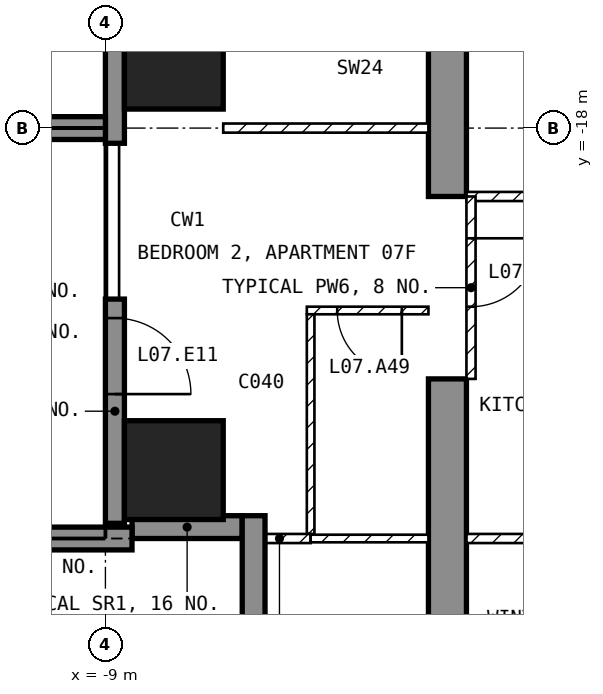
"""IFC4 building model, lengths in metres.
Left out: names, types, materials, properties, quantities, classifications, styles, units other than length and angle.
Written with IfcOpenShell. Run it as: python <this file> out.ifc"""

import sys

from ifc_helpers import new_model, si_unit, direction, frame, frame_2d, origin, origin_2d, place, context, subcontext, project, spatial, polyline, rectangle, outline, extrude, element, fill, save


model = new_model("IFC4")
c1 = context("Model", 3, precision=1e-05, world=origin(), true_north=direction((0.0, 1.0)))
c2 = subcontext(c1, "Body", "Model", "MODEL_VIEW")
j1 = project(units=[si_unit("LENGTHUNIT", "METRE"), si_unit("PLANEANGLEUNIT", "RADIAN")], contexts=[c1])
p1 = place(None, origin())
s1 = spatial("IfcSite", under=j1, at=p1, CompositionType="ELEMENT")
p2 = place(p1, origin())
s2 = spatial("IfcBuilding", under=s1, at=p2, CompositionType="ELEMENT")
p3 = place(p2, frame((0.0, 0.0, 43.5)))
s3 = spatial("IfcBuildingStorey", under=s2, at=p3, CompositionType="ELEMENT", Elevation=43.5)
for number, where, z_axis, x_axis in (
    (1, (-8.1, -22.5, -0.25), (0.0, 0.0, 1.0), (1.0, 0.0, 0.0)),
    (2, (-8.1, -17.1, -0.25), (0.0, 0.0, 1.0), (1.0, 0.0, 0.0)),
):
    element("IfcColumn", number, at=place(p3, frame(where, z_axis=z_axis, x_axis=x_axis)), inside=s3, PredefinedType="COLUMN", context=c2, shape_type="SweptSolid", body=[
        extrude(rectangle(XDim=1.3, YDim=1.3, at=origin_2d()), origin(), (0.0, 0.0, 1.0), 3.5),
    ])
p4 = place(p3, frame((-4.75, -25.45, -0.25), z_axis=(1.0, 0.0, 0.0), x_axis=(0.0, 1.0, 0.0)))
e3 = element("IfcWall", 3, at=p4, inside=s3, PredefinedType="SHEAR", context=c2, shape_type="SweptSolid", body=[
    extrude(outline(polyline([(0.0, 0.0), (4.15, 0.0), (4.15, 2.65), (6.55, 2.65), (6.55, 0.0), (11.95, 0.0), (11.95, 2.65), (14.35, 2.65), (14.35, 0.0), (16.45, 0.0), (16.45, 3.5), (0.0, 3.5), (0.0, 0.0)])), origin(), (0.0, 0.0, 1.0), 0.5),
])
p5 = place(p3, frame((-8.875, -14.65, 0.0), z_axis=(0.0, 0.0, 1.0), x_axis=(0.0, -1.0, 0.0)))
e4 = element("IfcWall", 4, at=p5, inside=s3, PredefinedType="SOLIDWALL", context=c2, shape_type="SweptSolid", body=[
    extrude(rectangle(XDim=3.55, YDim=0.25, at=frame_2d((1.775, 0.0))), origin(), (0.0, 0.0, 1.0), 3.25),
])
p6 = place(p5, frame((0.25, 0.0, 0.0)))
e5 = element("IfcOpeningElement", 5, at=p6, cuts=e4, PredefinedType="OPENING", context=c2, shape_type="SweptSolid", body=[
    extrude(rectangle(XDim=1.2, YDim=2.4, at=frame_2d((0.6, 1.2))), frame((0.0, 0.135, 0.0), z_axis=(0.0, -1.0, 0.0), x_axis=(1.0, 0.0, 0.0)), (0.0, 0.0, 1.0), 0.27),
])
p7 = place(p3, frame((-8.875, -20.25, 0.0), z_axis=(0.0, 0.0, 1.0), x_axis=(0.0, -1.0, 0.0)))
e6 = element("IfcWall", 6, at=p7, inside=s3, PredefinedType="SOLIDWALL", context=c2, shape_type="SweptSolid", body=[
    extrude(rectangle(XDim=2.95, YDim=0.25, at=frame_2d((1.475, 0.0))), origin(), (0.0, 0.0, 1.0), 3.25),
])
p8 = place(p7, frame((0.25, 0.0, 0.0)))
e7 = element("IfcOpeningElement", 7, at=p8, cuts=e6, PredefinedType="OPENING", context=c2, shape_type="SweptSolid", body=[
    extrude(rectangle(XDim=1.0, YDim=2.4, at=frame_2d((0.5, 1.2))), frame((0.0, 0.135, 0.0), z_axis=(0.0, -1.0, 0.0), x_axis=(1.0, 0.0, 0.0)), (0.0, 0.0, 1.0), 0.27),
])
p9 = place(p3, frame((-8.65, -23.25, 0.0), z_axis=(0.0, 0.0, 1.0), x_axis=(1.0, 0.0, 0.0)))
e8 = element("IfcWall", 8, at=p9, inside=s3, PredefinedType="SOLIDWALL", context=c2, shape_type="SweptSolid", body=[
    extrude(rectangle(XDim=1.45, YDim=0.3, at=frame_2d((0.725, 0.0))), origin(), (0.0, 0.0, 1.0), 3.25),
])
p10 = place(p3, frame((-7.05, -23.1, 0.0), z_axis=(0.0, 0.0, 1.0), x_axis=(0.0, -1.0, 0.0)))
e9 = element("IfcWall", 9, at=p10, inside=s3, PredefinedType="SOLIDWALL", context=c2, shape_type="SweptSolid", body=[
    extrude(rectangle(XDim=1.8, YDim=0.3, at=frame_2d((0.9, 0.0))), origin(), (0.0, 0.0, 1.0), 3.25),
])
p11 = place(p3, frame((-8.65, -23.4, 0.0), z_axis=(0.0, 0.0, 1.0), x_axis=(-1.0, 0.0, 0.0)))
e10 = element("IfcWall", 10, at=p11, inside=s3, PredefinedType="SOLIDWALL", context=c2, shape_type="SweptSolid", body=[
    extrude(rectangle(XDim=3.05, YDim=0.3, at=frame_2d((1.525, 0.0))), origin(), (0.0, 0.0, 1.0), 3.25),
])
p12 = place(p3, frame((-9.0, -18.0, 0.0), z_axis=(0.0, 0.0, 1.0), x_axis=(-1.0, 0.0, 0.0)))
e11 = element("IfcWall", 11, at=p12, inside=s3, PredefinedType="SOLIDWALL", context=c2, shape_type="SweptSolid", body=[
    extrude(rectangle(XDim=2.7, YDim=0.3, at=frame_2d((1.35, 0.0))), origin(), (0.0, 0.0, 1.0), 3.25),
])
p13 = place(p3, frame((4.25, -18.9, 0.0), z_axis=(0.0, 0.0, 1.0), x_axis=(-1.0, 0.0, 0.0)))
e12 = element("IfcWall", 12, at=p13, inside=s3, PredefinedType="PARTITIONING", context=c2, shape_type="SweptSolid", body=[
    extrude(rectangle(XDim=8.5, YDim=0.12, at=frame_2d((4.25, 0.0))), origin(), (0.0, 0.0, 1.0), 3.25),
])
p14 = place(p13, frame((1.925, 0.0, 0.0)))
e13 = element("IfcOpeningElement", 13, at=p14, cuts=e12, PredefinedType="OPENING", context=c2, shape_type="SweptSolid", body=[
    extrude(rectangle(XDim=0.9, YDim=2.1, at=frame_2d((0.45, 1.05))), frame((0.0, 0.07, 0.0), z_axis=(0.0, -1.0, 0.0), x_axis=(1.0, 0.0, 0.0)), (0.0, 0.0, 1.0), 0.14),
])
p15 = place(p3, frame((4.25, -23.4, 0.0), z_axis=(0.0, 0.0, 1.0), x_axis=(-1.0, 0.0, 0.0)))
e14 = element("IfcWall", 14, at=p15, inside=s3, PredefinedType="PARTITIONING", context=c2, shape_type="SweptSolid", body=[
    extrude(rectangle(XDim=8.5, YDim=0.12, at=frame_2d((4.25, 0.0))), origin(), (0.0, 0.0, 1.0), 3.25),
])
p16 = place(p15, frame((1.925, 0.0, 0.0)))
e15 = element("IfcOpeningElement", 15, at=p16, cuts=e14, PredefinedType="OPENING", context=c2, shape_type="SweptSolid", body=[
    extrude(rectangle(XDim=0.9, YDim=2.1, at=frame_2d((0.45, 1.05))), frame((0.0, 0.07, 0.0), z_axis=(0.0, -1.0, 0.0), x_axis=(1.0, 0.0, 0.0)), (0.0, 0.0, 1.0), 0.14),
])
p17 = place(p3, frame((-4.75, -18.0, 0.0), z_axis=(0.0, 0.0, 1.0), x_axis=(-1.0, 0.0, 0.0)))
e16 = element("IfcWall", 16, at=p17, inside=s3, PredefinedType="PARTITIONING", context=c2, shape_type="SweptSolid", body=[
    extrude(rectangle(XDim=2.7, YDim=0.12, at=frame_2d((1.35, 0.0))), origin(), (0.0, 0.0, 1.0), 3.25),
])
p18 = place(p3, frame((-4.75, -20.4, 0.0), z_axis=(0.0, 0.0, 1.0), x_axis=(-1.0, 0.0, 0.0)))
e17 = element("IfcWall", 17, at=p18, inside=s3, PredefinedType="PARTITIONING", context=c2, shape_type="SweptSolid", body=[
    extrude(rectangle(XDim=1.6, YDim=0.1, at=frame_2d((0.8, 0.0))), origin(), (0.0, 0.0, 1.0), 3.25),
])
p19 = place(p18, frame((0.35, 0.0, 0.0)))
e18 = element("IfcOpeningElement", 18, at=p19, cuts=e17, PredefinedType="OPENING", context=c2, shape_type="SweptSolid", body=[
    extrude(rectangle(XDim=0.85, YDim=2.1, at=frame_2d((0.425, 1.05))), frame((0.0, 0.06, 0.0), z_axis=(0.0, -1.0, 0.0), x_axis=(1.0, 0.0, 0.0)), (0.0, 0.0, 1.0), 0.12),
])
p20 = place(p3, frame((-6.3, -20.45, 0.0), z_axis=(0.0, 0.0, 1.0), x_axis=(0.0, -1.0, 0.0)))
e19 = element("IfcWall", 19, at=p20, inside=s3, PredefinedType="PARTITIONING", context=c2, shape_type="SweptSolid", body=[
    extrude(rectangle(XDim=2.89, YDim=0.1, at=frame_2d((1.445, 0.0))), origin(), (0.0, 0.0, 1.0), 3.25),
])
p21 = place(p3, frame((-6.3, -23.4, 0.0), z_axis=(0.0, 0.0, 1.0), x_axis=(-1.0, 0.0, 0.0)))
e20 = element("IfcWall", 20, at=p21, inside=s3, PredefinedType="PARTITIONING", context=c2, shape_type="SweptSolid", body=[
    extrude(rectangle(XDim=0.82, YDim=0.12, at=frame_2d((0.41, 0.0))), origin(), (0.0, 0.0, 1.0), 3.25),
])
p22 = place(p3, frame((-4.75, -23.4, 0.0), z_axis=(0.0, 0.0, 1.0), x_axis=(-1.0, 0.0, 0.0)))
e21 = element("IfcWall", 21, at=p22, inside=s3, PredefinedType="PARTITIONING", context=c2, shape_type="SweptSolid", body=[
    extrude(rectangle(XDim=1.55, YDim=0.1, at=frame_2d((0.775, 0.0))), origin(), (0.0, 0.0, 1.0), 3.25),
])
p23 = place(p3, frame((-4.19, -18.9, 0.0), z_axis=(0.0, 0.0, 1.0), x_axis=(0.0, -1.0, 0.0)))
e22 = element("IfcWall", 22, at=p23, inside=s3, PredefinedType="PARTITIONING", context=c2, shape_type="SweptSolid", body=[
    extrude(rectangle(XDim=2.4, YDim=0.12, at=frame_2d((1.2, 0.0))), origin(), (0.0, 0.0, 1.0), 2.4),
])
p24 = place(p23, frame((0.55, 0.0, 0.0)))
e23 = element("IfcOpeningElement", 23, at=p24, cuts=e22, PredefinedType="OPENING", context=c2, shape_type="SweptSolid", body=[
    extrude(rectangle(XDim=0.9, YDim=2.1, at=frame_2d((0.45, 1.05))), frame((0.0, 0.07, 0.0), z_axis=(0.0, -1.0, 0.0), x_axis=(1.0, 0.0, 0.0)), (0.0, 0.0, 1.0), 0.14),
])
p25 = place(p8, origin())
e24 = element("IfcDoor", 24, at=p25, inside=s3, OperationType="SINGLE_SWING_RIGHT", PredefinedType="DOOR", context=c2, shape_type="SweptSolid", body=[
    extrude(rectangle(XDim=1.0, YDim=2.4, at=frame_2d((0.5, 1.2))), frame((0.0, 0.025, 0.0), z_axis=(0.0, -1.0, 0.0), x_axis=(1.0, 0.0, 0.0)), (0.0, 0.0, 1.0), 0.05),
])
fill(e7, e24)
p26 = place(p19, origin())
e25 = element("IfcDoor", 25, at=p26, inside=s3, OperationType="SINGLE_SWING_LEFT", PredefinedType="DOOR", context=c2, shape_type="SweptSolid", body=[
    extrude(rectangle(XDim=0.85, YDim=2.1, at=frame_2d((0.425, 1.05))), frame((0.0, 0.025, 0.0), z_axis=(0.0, -1.0, 0.0), x_axis=(1.0, 0.0, 0.0)), (0.0, 0.0, 1.0), 0.05),
])
fill(e18, e25)
p27 = place(p24, origin())
e26 = element("IfcDoor", 26, at=p27, inside=s3, OperationType="SINGLE_SWING_LEFT", PredefinedType="DOOR", context=c2, shape_type="SweptSolid", body=[
    extrude(rectangle(XDim=0.9, YDim=2.1, at=frame_2d((0.45, 1.05))), frame((0.0, 0.025, 0.0), z_axis=(0.0, -1.0, 0.0), x_axis=(1.0, 0.0, 0.0)), (0.0, 0.0, 1.0), 0.05),
])
fill(e23, e26)
save(model, sys.argv[1])
